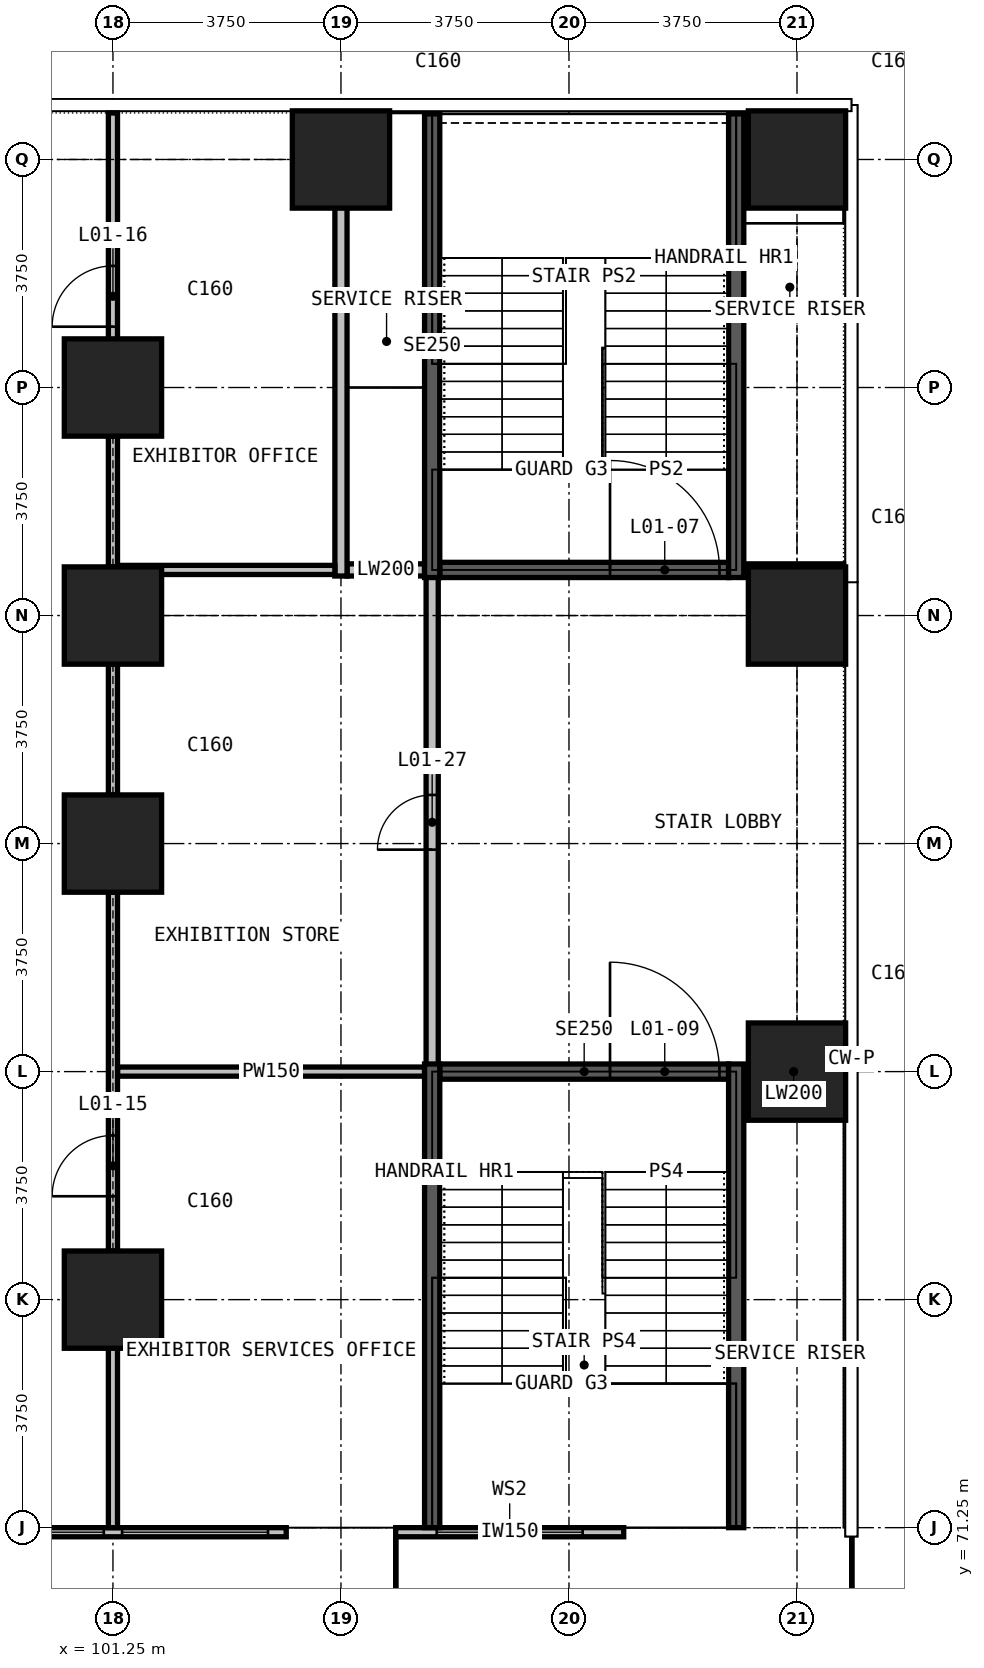
"""IFC4 building model, lengths in metres.
Left out: names, types, materials, properties, quantities, classifications, styles, units other than length and angle.
Written with IfcOpenShell. Run it as: python <this file> out.ifc"""

import sys

from ifc_helpers import new_model, si_unit, direction, frame, frame_2d, origin, origin_2d, place, context, subcontext, project, spatial, polyline, rectangle, outline, extrude, element, fill, save


model = new_model("IFC4")
c1 = context("Model", 3, precision=1e-05, world=origin(), true_north=direction((0.0, 1.0)))
c2 = subcontext(c1, "Body", "Model", "MODEL_VIEW")
j1 = project(units=[si_unit("LENGTHUNIT", "METRE"), si_unit("PLANEANGLEUNIT", "RADIAN")], contexts=[c1])
p1 = place(None, origin())
s1 = spatial("IfcSite", under=j1, at=p1, CompositionType="ELEMENT")
p2 = place(p1, origin())
s2 = spatial("IfcBuilding", under=s1, at=p2, CompositionType="ELEMENT")
p3 = place(p2, frame((0.0, 0.0, 7.5)))
s3 = spatial("IfcBuildingStorey", under=s2, at=p3, CompositionType="ELEMENT", Elevation=7.5)
p4 = place(p3, frame((105.9, 66.562, 0.84), z_axis=(1.0, 0.0, 0.0), x_axis=(0.0, 0.371855891589, -0.928290469568)))
e1 = element("IfcWall", 1, at=p4, inside=s3, PredefinedType="SHEAR", context=c2, shape_type="SweptSolid", body=[
    extrude(outline(polyline([(0.0, 0.0), (0.905, 0.0), (2.523, 4.039), (-5.832, 7.386), (-9.19, -0.996), (-8.194, -0.757), (-6.429, -0.454), (-4.475, -0.227), (-2.332, -0.076), (0.0, 0.0)])), origin(), (0.0, 0.0, -1.0), 1.8),
])
p5 = place(p3, frame((113.4, 66.562, 0.84), z_axis=(1.0, 0.0, 0.0), x_axis=(0.0, 0.371855891589, -0.928290469568)))
e2 = element("IfcWall", 2, at=p5, inside=s3, PredefinedType="SHEAR", context=c2, shape_type="SweptSolid", body=[
    extrude(outline(polyline([(0.0, 0.0), (0.905, 0.0), (2.523, 4.039), (-5.832, 7.386), (-9.19, -0.996), (-8.194, -0.757), (-6.429, -0.454), (-4.475, -0.227), (-2.332, -0.076), (0.0, 0.0)])), origin(), (0.0, 0.0, -1.0), 3.75),
])
for number, where, z_axis, x_axis in (
    (3, (101.25, 75.0, 0.0), (0.0, 0.0, 1.0), (1.0, 0.0, 0.0)),
    (4, (101.25, 82.5, 0.0), (0.0, 0.0, 1.0), (1.0, 0.0, 0.0)),
    (5, (101.25, 86.25, 0.0), (0.0, 0.0, 1.0), (1.0, 0.0, 0.0)),
    (6, (101.25, 90.0, 0.0), (0.0, 0.0, 1.0), (1.0, 0.0, 0.0)),
    (7, (105.0, 93.75, 0.0), (0.0, 0.0, 1.0), (1.0, 0.0, 0.0)),
    (8, (112.5, 78.75, 0.0), (0.0, 0.0, 1.0), (1.0, 0.0, 0.0)),
    (9, (112.5, 86.25, 0.0), (0.0, 0.0, 1.0), (1.0, 0.0, 0.0)),
    (10, (112.5, 93.75, 0.0), (0.0, 0.0, 1.0), (1.0, 0.0, 0.0)),
):
    element("IfcColumn", number, at=place(p3, frame(where, z_axis=z_axis, x_axis=x_axis)), inside=s3, PredefinedType="COLUMN", context=c2, shape_type="SweptSolid", body=[
        extrude(rectangle(XDim=1.6, YDim=1.6, at=origin_2d()), origin(), (0.0, 0.0, 1.0), 9.0),
    ])
p6 = place(p3, frame((98.4, 71.175, 0.0), z_axis=(0.0, 0.0, 1.0), x_axis=(1.0, 0.0, 0.0)))
e11 = element("IfcWall", 11, at=p6, inside=s3, PredefinedType="SOLIDWALL", context=c2, shape_type="SweptSolid", body=[
    extrude(rectangle(XDim=5.7, YDim=0.15, at=frame_2d((2.85, 0.0))), origin(), (0.0, 0.0, 1.0), 8.65),
])
p7 = place(p6, frame((0.3, 0.0, 0.9)))
e12 = element("IfcOpeningElement", 12, at=p7, cuts=e11, PredefinedType="OPENING", context=c2, shape_type="SweptSolid", body=[
    extrude(rectangle(XDim=2.4, YDim=3.6, at=frame_2d((1.2, 1.8))), frame((0.0, 0.085, 0.0), z_axis=(0.0, -1.0, 0.0), x_axis=(1.0, 0.0, 0.0)), (0.0, 0.0, 1.0), 0.17),
])
p8 = place(p6, frame((3.0, 0.0, 0.9)))
e13 = element("IfcOpeningElement", 13, at=p8, cuts=e11, PredefinedType="OPENING", context=c2, shape_type="SweptSolid", body=[
    extrude(rectangle(XDim=2.4, YDim=3.6, at=frame_2d((1.2, 1.8))), frame((0.0, 0.085, 0.0), z_axis=(0.0, -1.0, 0.0), x_axis=(1.0, 0.0, 0.0)), (0.0, 0.0, 1.0), 0.17),
])
p9 = place(p3, frame((105.9, 71.175, 0.0), z_axis=(0.0, 0.0, 1.0), x_axis=(1.0, 0.0, 0.0)))
e14 = element("IfcWall", 14, at=p9, inside=s3, PredefinedType="SOLIDWALL", context=c2, shape_type="SweptSolid", body=[
    extrude(rectangle(XDim=3.75, YDim=0.15, at=frame_2d((1.875, 0.0))), origin(), (0.0, 0.0, 1.0), 8.65),
])
p10 = place(p9, frame((0.675, 0.0, 0.9)))
e15 = element("IfcOpeningElement", 15, at=p10, cuts=e14, PredefinedType="OPENING", context=c2, shape_type="SweptSolid", body=[
    extrude(rectangle(XDim=2.4, YDim=3.6, at=frame_2d((1.2, 1.8))), frame((0.0, 0.085, 0.0), z_axis=(0.0, -1.0, 0.0), x_axis=(1.0, 0.0, 0.0)), (0.0, 0.0, 1.0), 0.17),
])
p11 = place(p3, frame((111.625, 78.75, 0.0), z_axis=(0.0, 0.0, 1.0), x_axis=(1.0, 0.0, 0.0)))
e16 = element("IfcWall", 16, at=p11, inside=s3, PredefinedType="PARTITIONING", context=c2, shape_type="SweptSolid", body=[
    extrude(rectangle(XDim=1.64, YDim=0.2, at=frame_2d((0.82, 0.0))), origin(), (0.0, 0.0, 1.0), 8.65),
])
p12 = place(p3, frame((105.1, 87.0, 0.0), z_axis=(0.0, 0.0, 1.0), x_axis=(1.0, 0.0, 0.0)))
e17 = element("IfcWall", 17, at=p12, inside=s3, PredefinedType="PARTITIONING", context=c2, shape_type="SweptSolid", body=[
    extrude(rectangle(XDim=1.275, YDim=0.2, at=frame_2d((0.637, 0.0))), origin(), (0.0, 0.0, 1.0), 8.65),
])
p13 = place(p3, frame((111.625, 87.0, 0.0), z_axis=(0.0, 0.0, 1.0), x_axis=(1.0, 0.0, 0.0)))
e18 = element("IfcWall", 18, at=p13, inside=s3, PredefinedType="PARTITIONING", context=c2, shape_type="SweptSolid", body=[
    extrude(rectangle(XDim=1.64, YDim=0.2, at=frame_2d((0.82, 0.0))), origin(), (0.0, 0.0, 1.0), 8.65),
])
p14 = place(p3, frame((105.0, 86.9, 0.0), z_axis=(0.0, 0.0, 1.0), x_axis=(0.0, 1.0, 0.0)))
e19 = element("IfcWall", 19, at=p14, inside=s3, PredefinedType="PARTITIONING", context=c2, shape_type="SweptSolid", body=[
    extrude(rectangle(XDim=7.615, YDim=0.2, at=frame_2d((3.808, 0.0))), origin(), (0.0, 0.0, 1.0), 8.65),
])
p15 = place(p3, frame((106.5, 78.625, 0.0), z_axis=(0.0, 0.0, 1.0), x_axis=(0.0, 1.0, 0.0)))
e20 = element("IfcWall", 20, at=p15, inside=s3, PredefinedType="PARTITIONING", context=c2, shape_type="SweptSolid", body=[
    extrude(rectangle(XDim=8.5, YDim=0.2, at=frame_2d((4.25, 0.0))), origin(), (0.0, 0.0, 1.0), 8.65),
])
p16 = place(p15, frame((3.775, 0.0, 0.0)))
e21 = element("IfcOpeningElement", 21, at=p16, cuts=e20, PredefinedType="OPENING", context=c2, shape_type="SweptSolid", body=[
    extrude(rectangle(XDim=0.9, YDim=2.2, at=frame_2d((0.45, 1.1))), frame((0.0, 0.11, 0.0), z_axis=(0.0, -1.0, 0.0), x_axis=(1.0, 0.0, 0.0)), (0.0, 0.0, 1.0), 0.22),
])
p17 = place(p3, frame((101.325, 78.75, 0.0), z_axis=(0.0, 0.0, 1.0), x_axis=(1.0, 0.0, 0.0)))
e22 = element("IfcWall", 22, at=p17, inside=s3, PredefinedType="PARTITIONING", context=c2, shape_type="SweptSolid", body=[
    extrude(rectangle(XDim=5.05, YDim=0.15, at=frame_2d((2.525, 0.0))), origin(), (0.0, 0.0, 1.0), 8.65),
])
p18 = place(p3, frame((101.325, 87.0, 0.0), z_axis=(0.0, 0.0, 1.0), x_axis=(1.0, 0.0, 0.0)))
e23 = element("IfcWall", 23, at=p18, inside=s3, PredefinedType="PARTITIONING", context=c2, shape_type="SweptSolid", body=[
    extrude(rectangle(XDim=3.575, YDim=0.15, at=frame_2d((1.788, 0.0))), origin(), (0.0, 0.0, 1.0), 8.65),
])
p19 = place(p3, frame((101.25, 71.25, 0.0), z_axis=(0.0, 0.0, 1.0), x_axis=(0.0, 1.0, 0.0)))
e24 = element("IfcWall", 24, at=p19, inside=s3, PredefinedType="PARTITIONING", context=c2, shape_type="SweptSolid", body=[
    extrude(rectangle(XDim=4.549, YDim=0.15, at=frame_2d((2.274, 0.0))), origin(), (0.0, 0.0, 1.0), 8.65),
])
p20 = place(p3, frame((101.25, 75.799, 0.0), z_axis=(0.0, 0.0, 1.0), x_axis=(0.0, 1.0, 0.0)))
e25 = element("IfcWall", 25, at=p20, inside=s3, PredefinedType="PARTITIONING", context=c2, shape_type="SweptSolid", body=[
    extrude(rectangle(XDim=5.902, YDim=0.15, at=frame_2d((2.951, 0.0))), origin(), (0.0, 0.0, 1.0), 7.85),
])
p21 = place(p20, frame((0.901, 0.0, 0.0)))
e26 = element("IfcOpeningElement", 26, at=p21, cuts=e25, PredefinedType="OPENING", context=c2, shape_type="SweptSolid", body=[
    extrude(rectangle(XDim=1.0, YDim=2.2, at=frame_2d((0.5, 1.1))), frame((0.0, 0.085, 0.0), z_axis=(0.0, -1.0, 0.0), x_axis=(1.0, 0.0, 0.0)), (0.0, 0.0, 1.0), 0.17),
])
p22 = place(p3, frame((101.25, 81.701, 0.0), z_axis=(0.0, 0.0, 1.0), x_axis=(0.0, 1.0, 0.0)))
e27 = element("IfcWall", 27, at=p22, inside=s3, PredefinedType="PARTITIONING", context=c2, shape_type="SweptSolid", body=[
    extrude(rectangle(XDim=1.598, YDim=0.15, at=frame_2d((0.799, 0.0))), origin(), (0.0, 0.0, 1.0), 8.65),
])
p23 = place(p3, frame((101.25, 83.299, 0.0), z_axis=(0.0, 0.0, 1.0), x_axis=(0.0, 1.0, 0.0)))
e28 = element("IfcWall", 28, at=p23, inside=s3, PredefinedType="PARTITIONING", context=c2, shape_type="SweptSolid", body=[
    extrude(rectangle(XDim=2.152, YDim=0.15, at=frame_2d((1.076, 0.0))), origin(), (0.0, 0.0, 1.0), 7.85),
])
p24 = place(p3, frame((101.25, 85.451, 0.0), z_axis=(0.0, 0.0, 1.0), x_axis=(0.0, 1.0, 0.0)))
e29 = element("IfcWall", 29, at=p24, inside=s3, PredefinedType="PARTITIONING", context=c2, shape_type="SweptSolid", body=[
    extrude(rectangle(XDim=1.598, YDim=0.15, at=frame_2d((0.799, 0.0))), origin(), (0.0, 0.0, 1.0), 8.65),
])
p25 = place(p3, frame((101.25, 87.049, 0.0), z_axis=(0.0, 0.0, 1.0), x_axis=(0.0, 1.0, 0.0)))
e30 = element("IfcWall", 30, at=p25, inside=s3, PredefinedType="PARTITIONING", context=c2, shape_type="SweptSolid", body=[
    extrude(rectangle(XDim=2.152, YDim=0.15, at=frame_2d((1.076, 0.0))), origin(), (0.0, 0.0, 1.0), 7.85),
])
p26 = place(p3, frame((101.25, 89.201, 0.0), z_axis=(0.0, 0.0, 1.0), x_axis=(0.0, 1.0, 0.0)))
e31 = element("IfcWall", 31, at=p26, inside=s3, PredefinedType="PARTITIONING", context=c2, shape_type="SweptSolid", body=[
    extrude(rectangle(XDim=5.314, YDim=0.15, at=frame_2d((2.657, 0.0))), origin(), (0.0, 0.0, 1.0), 8.65),
])
p27 = place(p26, frame((1.799, 0.0, 0.0)))
e32 = element("IfcOpeningElement", 32, at=p27, cuts=e31, PredefinedType="OPENING", context=c2, shape_type="SweptSolid", body=[
    extrude(rectangle(XDim=1.0, YDim=2.2, at=frame_2d((0.5, 1.1))), frame((0.0, 0.085, 0.0), z_axis=(0.0, -1.0, 0.0), x_axis=(1.0, 0.0, 0.0)), (0.0, 0.0, 1.0), 0.17),
])
p28 = place(p3, frame((106.625, 78.75, 0.0), z_axis=(0.0, 0.0, 1.0), x_axis=(1.0, 0.0, 0.0)))
e33 = element("IfcWall", 33, at=p28, inside=s3, PredefinedType="PARTITIONING", context=c2, shape_type="SweptSolid", body=[
    extrude(rectangle(XDim=4.75, YDim=0.25, at=frame_2d((2.375, 0.0))), origin(), (0.0, 0.0, 1.0), 8.65),
])
p29 = place(p28, frame((2.8, 0.0, 0.0)))
e34 = element("IfcOpeningElement", 34, at=p29, cuts=e33, PredefinedType="OPENING", context=c2, shape_type="SweptSolid", body=[
    extrude(rectangle(XDim=1.8, YDim=2.2, at=frame_2d((0.9, 1.1))), frame((0.0, 0.135, 0.0), z_axis=(0.0, -1.0, 0.0), x_axis=(1.0, 0.0, 0.0)), (0.0, 0.0, 1.0), 0.27),
])
p30 = place(p3, frame((106.625, 87.0, 0.0), z_axis=(0.0, 0.0, 1.0), x_axis=(1.0, 0.0, 0.0)))
e35 = element("IfcWall", 35, at=p30, inside=s3, PredefinedType="PARTITIONING", context=c2, shape_type="SweptSolid", body=[
    extrude(rectangle(XDim=4.75, YDim=0.25, at=frame_2d((2.375, 0.0))), origin(), (0.0, 0.0, 1.0), 8.65),
])
p31 = place(p30, frame((2.8, 0.0, 0.0)))
e36 = element("IfcOpeningElement", 36, at=p31, cuts=e35, PredefinedType="OPENING", context=c2, shape_type="SweptSolid", body=[
    extrude(rectangle(XDim=1.8, YDim=2.2, at=frame_2d((0.9, 1.1))), frame((0.0, 0.135, 0.0), z_axis=(0.0, -1.0, 0.0), x_axis=(1.0, 0.0, 0.0)), (0.0, 0.0, 1.0), 0.27),
])
for number, where, z_axis, x_axis in (
    (37, (106.5, 71.25, 0.0), (0.0, 0.0, 1.0), (0.0, 1.0, 0.0)),
    (38, (106.5, 86.875, 0.0), (0.0, 0.0, 1.0), (0.0, 1.0, 0.0)),
    (39, (111.5, 71.25, 0.0), (0.0, 0.0, 1.0), (0.0, 1.0, 0.0)),
    (40, (111.5, 86.875, 0.0), (0.0, 0.0, 1.0), (0.0, 1.0, 0.0)),
):
    element("IfcWall", number, at=place(p3, frame(where, z_axis=z_axis, x_axis=x_axis)), inside=s3, PredefinedType="PARTITIONING", context=c2, shape_type="SweptSolid", body=[
        extrude(rectangle(XDim=7.625, YDim=0.25, at=frame_2d((3.812, 0.0))), origin(), (0.0, 0.0, 1.0), 8.65),
    ])
p32 = place(p7, origin())
e41 = element("IfcWindow", 41, at=p32, inside=s3, PartitioningType="SINGLE_PANEL", PredefinedType="WINDOW", context=c2, shape_type="SweptSolid", body=[
    extrude(rectangle(XDim=2.4, YDim=3.6, at=frame_2d((1.2, 1.8))), frame((0.0, 0.03, 0.0), z_axis=(0.0, -1.0, 0.0), x_axis=(1.0, 0.0, 0.0)), (0.0, 0.0, 1.0), 0.06),
])
fill(e12, e41)
p33 = place(p8, origin())
e42 = element("IfcWindow", 42, at=p33, inside=s3, PartitioningType="SINGLE_PANEL", PredefinedType="WINDOW", context=c2, shape_type="SweptSolid", body=[
    extrude(rectangle(XDim=2.4, YDim=3.6, at=frame_2d((1.2, 1.8))), frame((0.0, 0.03, 0.0), z_axis=(0.0, -1.0, 0.0), x_axis=(1.0, 0.0, 0.0)), (0.0, 0.0, 1.0), 0.06),
])
fill(e13, e42)
p34 = place(p10, origin())
e43 = element("IfcWindow", 43, at=p34, inside=s3, PartitioningType="SINGLE_PANEL", PredefinedType="WINDOW", context=c2, shape_type="SweptSolid", body=[
    extrude(rectangle(XDim=2.4, YDim=3.6, at=frame_2d((1.2, 1.8))), frame((0.0, 0.03, 0.0), z_axis=(0.0, -1.0, 0.0), x_axis=(1.0, 0.0, 0.0)), (0.0, 0.0, 1.0), 0.06),
])
fill(e15, e43)
p35 = place(p31, origin())
e44 = element("IfcDoor", 44, at=p35, inside=s3, OperationType="DOUBLE_DOOR_SINGLE_SWING", PredefinedType="DOOR", context=c2, shape_type="SweptSolid", body=[
    extrude(rectangle(XDim=1.8, YDim=2.2, at=frame_2d((0.9, 1.1))), frame((0.0, 0.025, 0.0), z_axis=(0.0, -1.0, 0.0), x_axis=(1.0, 0.0, 0.0)), (0.0, 0.0, 1.0), 0.05),
])
fill(e36, e44)
p36 = place(p29, origin())
e45 = element("IfcDoor", 45, at=p36, inside=s3, OperationType="DOUBLE_DOOR_SINGLE_SWING", PredefinedType="DOOR", context=c2, shape_type="SweptSolid", body=[
    extrude(rectangle(XDim=1.8, YDim=2.2, at=frame_2d((0.9, 1.1))), frame((0.0, 0.025, 0.0), z_axis=(0.0, -1.0, 0.0), x_axis=(1.0, 0.0, 0.0)), (0.0, 0.0, 1.0), 0.05),
])
fill(e34, e45)
p37 = place(p21, origin())
e46 = element("IfcDoor", 46, at=p37, inside=s3, OperationType="SINGLE_SWING_LEFT", PredefinedType="DOOR", context=c2, shape_type="SweptSolid", body=[
    extrude(rectangle(XDim=1.0, YDim=2.2, at=frame_2d((0.5, 1.1))), frame((0.0, 0.025, 0.0), z_axis=(0.0, -1.0, 0.0), x_axis=(1.0, 0.0, 0.0)), (0.0, 0.0, 1.0), 0.05),
])
fill(e26, e46)
p38 = place(p27, origin())
e47 = element("IfcDoor", 47, at=p38, inside=s3, OperationType="SINGLE_SWING_RIGHT", PredefinedType="DOOR", context=c2, shape_type="SweptSolid", body=[
    extrude(rectangle(XDim=1.0, YDim=2.2, at=frame_2d((0.5, 1.1))), frame((0.0, 0.025, 0.0), z_axis=(0.0, -1.0, 0.0), x_axis=(1.0, 0.0, 0.0)), (0.0, 0.0, 1.0), 0.05),
])
fill(e32, e47)
p39 = place(p16, origin())
e48 = element("IfcDoor", 48, at=p39, inside=s3, OperationType="SINGLE_SWING_LEFT", PredefinedType="DOOR", context=c2, shape_type="SweptSolid", body=[
    extrude(rectangle(XDim=0.9, YDim=2.2, at=frame_2d((0.45, 1.1))), frame((0.0, 0.025, 0.0), z_axis=(0.0, -1.0, 0.0), x_axis=(1.0, 0.0, 0.0)), (0.0, 0.0, 1.0), 0.05),
])
fill(e21, e48)
save(model, sys.argv[1])
